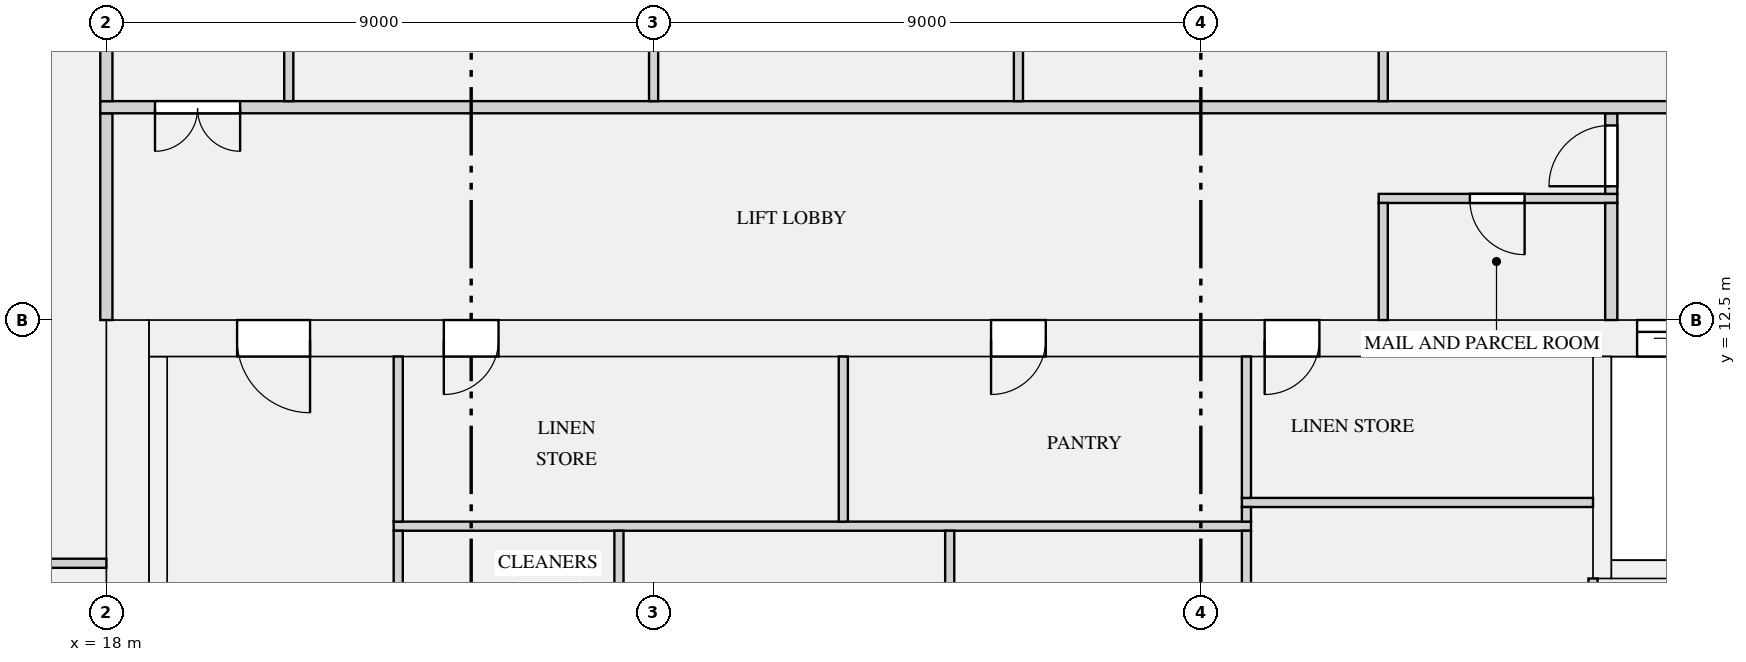
"""IFC4 building model, lengths in metres.
Left out: names, types, materials, properties, quantities, classifications, styles, units other than length and angle.
Written with IfcOpenShell. Run it as: python <this file> out.ifc"""

import sys

from ifc_helpers import new_model, si_unit, direction, frame, frame_2d, origin, place, context, subcontext, project, spatial, rectangle, extrude, element, fill, save


model = new_model("IFC4")
c1 = context("Model", 3, precision=1e-05, world=origin(), true_north=direction((0.0, 1.0)))
c2 = subcontext(c1, "Body", "Model", "MODEL_VIEW")
j1 = project(units=[si_unit("LENGTHUNIT", "METRE"), si_unit("PLANEANGLEUNIT", "RADIAN")], contexts=[c1])
p1 = place(None, origin())
s1 = spatial("IfcSite", under=j1, at=p1, CompositionType="ELEMENT")
p2 = place(p1, origin())
s2 = spatial("IfcBuilding", under=s1, at=p2, CompositionType="ELEMENT")
p3 = place(p2, frame((0.0, 0.0, 160.2)))
s3 = spatial("IfcBuildingStorey", under=s2, at=p3, CompositionType="ELEMENT", Elevation=160.2)
p4 = place(p3, frame((18.35, 0.0, 0.0), z_axis=(0.0, 0.0, 1.0), x_axis=(0.0, 1.0, 0.0)))
e1 = element("IfcWall", 1, at=p4, inside=s3, PredefinedType="SHEAR", context=c2, shape_type="SweptSolid", body=[
    extrude(rectangle(XDim=12.5, YDim=0.7, at=frame_2d((6.25, 0.0))), origin(), (0.0, 0.0, 1.0), 3.15),
])
p5 = place(p3, frame((18.7, 12.2, 0.0), z_axis=(0.0, 0.0, 1.0), x_axis=(1.0, 0.0, 0.0)))
e2 = element("IfcWall", 2, at=p5, inside=s3, PredefinedType="SHEAR", context=c2, shape_type="SweptSolid", body=[
    extrude(rectangle(XDim=34.6, YDim=0.6, at=frame_2d((17.3, 0.0))), origin(), (0.0, 0.0, 1.0), 3.15),
])
p6 = place(p5, frame((24.475, 0.0, 0.0)))
e3 = element("IfcOpeningElement", 3, at=p6, cuts=e2, PredefinedType="OPENING", context=c2, shape_type="SweptSolid", body=[
    extrude(rectangle(XDim=1.1, YDim=2.1, at=frame_2d((0.55, 1.05))), frame((0.0, 0.31, 0.0), z_axis=(0.0, -1.0, 0.0), x_axis=(1.0, 0.0, 0.0)), (0.0, 0.0, 1.0), 0.62),
])
p7 = place(p5, frame((26.725, 0.0, 0.0)))
e4 = element("IfcOpeningElement", 4, at=p7, cuts=e2, PredefinedType="OPENING", context=c2, shape_type="SweptSolid", body=[
    extrude(rectangle(XDim=1.1, YDim=2.1, at=frame_2d((0.55, 1.05))), frame((0.0, 0.31, 0.0), z_axis=(0.0, -1.0, 0.0), x_axis=(1.0, 0.0, 0.0)), (0.0, 0.0, 1.0), 0.62),
])
p8 = place(p5, frame((28.975, 0.0, 0.0)))
e5 = element("IfcOpeningElement", 5, at=p8, cuts=e2, PredefinedType="OPENING", context=c2, shape_type="SweptSolid", body=[
    extrude(rectangle(XDim=1.1, YDim=2.1, at=frame_2d((0.55, 1.05))), frame((0.0, 0.31, 0.0), z_axis=(0.0, -1.0, 0.0), x_axis=(1.0, 0.0, 0.0)), (0.0, 0.0, 1.0), 0.62),
])
p9 = place(p5, frame((4.85, 0.0, 0.0)))
e6 = element("IfcOpeningElement", 6, at=p9, cuts=e2, PredefinedType="OPENING", context=c2, shape_type="SweptSolid", body=[
    extrude(rectangle(XDim=0.9, YDim=2.1, at=frame_2d((0.45, 1.05))), frame((0.0, 0.31, 0.0), z_axis=(0.0, -1.0, 0.0), x_axis=(1.0, 0.0, 0.0)), (0.0, 0.0, 1.0), 0.62),
])
p10 = place(p5, frame((13.85, 0.0, 0.0)))
e7 = element("IfcOpeningElement", 7, at=p10, cuts=e2, PredefinedType="OPENING", context=c2, shape_type="SweptSolid", body=[
    extrude(rectangle(XDim=0.9, YDim=2.1, at=frame_2d((0.45, 1.05))), frame((0.0, 0.31, 0.0), z_axis=(0.0, -1.0, 0.0), x_axis=(1.0, 0.0, 0.0)), (0.0, 0.0, 1.0), 0.62),
])
p11 = place(p5, frame((18.35, 0.0, 0.0)))
e8 = element("IfcOpeningElement", 8, at=p11, cuts=e2, PredefinedType="OPENING", context=c2, shape_type="SweptSolid", body=[
    extrude(rectangle(XDim=0.9, YDim=2.1, at=frame_2d((0.45, 1.05))), frame((0.0, 0.31, 0.0), z_axis=(0.0, -1.0, 0.0), x_axis=(1.0, 0.0, 0.0)), (0.0, 0.0, 1.0), 0.62),
])
p12 = place(p5, frame((1.45, 0.0, 0.0)))
e9 = element("IfcOpeningElement", 9, at=p12, cuts=e2, PredefinedType="OPENING", context=c2, shape_type="SweptSolid", body=[
    extrude(rectangle(XDim=1.2, YDim=2.1, at=frame_2d((0.6, 1.05))), frame((0.0, 0.31, 0.0), z_axis=(0.0, -1.0, 0.0), x_axis=(1.0, 0.0, 0.0)), (0.0, 0.0, 1.0), 0.62),
])
p13 = place(p5, frame((31.95, 0.0, 0.0)))
e10 = element("IfcOpeningElement", 10, at=p13, cuts=e2, PredefinedType="OPENING", context=c2, shape_type="SweptSolid", body=[
    extrude(rectangle(XDim=1.2, YDim=2.1, at=frame_2d((0.6, 1.05))), frame((0.0, 0.31, 0.0), z_axis=(0.0, -1.0, 0.0), x_axis=(1.0, 0.0, 0.0)), (0.0, 0.0, 1.0), 0.62),
])
p14 = place(p3, frame((18.85, 1.0, 0.0), z_axis=(0.0, 0.0, 1.0), x_axis=(0.0, 1.0, 0.0)))
e11 = element("IfcWall", 11, at=p14, inside=s3, PredefinedType="SHEAR", context=c2, shape_type="SweptSolid", body=[
    extrude(rectangle(XDim=10.9, YDim=0.3, at=frame_2d((5.45, 0.0))), origin(), (0.0, 0.0, 1.0), 3.15),
])
p15 = place(p3, frame((42.75, 8.4, 0.0), z_axis=(0.0, 0.0, 1.0), x_axis=(1.0, 0.0, 0.0)))
e12 = element("IfcWall", 12, at=p15, inside=s3, PredefinedType="SHEAR", context=c2, shape_type="SweptSolid", body=[
    extrude(rectangle(XDim=1.95, YDim=0.3, at=frame_2d((0.975, 0.0))), origin(), (0.0, 0.0, 1.0), 3.15),
])
p16 = place(p3, frame((42.6, 8.25, 0.0), z_axis=(0.0, 0.0, 1.0), x_axis=(0.0, 1.0, 0.0)))
e13 = element("IfcWall", 13, at=p16, inside=s3, PredefinedType="SHEAR", context=c2, shape_type="SweptSolid", body=[
    extrude(rectangle(XDim=3.65, YDim=0.3, at=frame_2d((1.825, 0.0))), origin(), (0.0, 0.0, 1.0), 3.15),
])
p17 = place(p3, frame((22.725, 9.11, 0.0), z_axis=(0.0, 0.0, 1.0), x_axis=(1.0, 0.0, 0.0)))
e14 = element("IfcWall", 14, at=p17, inside=s3, PredefinedType="PARTITIONING", context=c2, shape_type="SweptSolid", body=[
    extrude(rectangle(XDim=14.1, YDim=0.15, at=frame_2d((7.05, 0.0))), origin(), (0.0, 0.0, 1.0), 2.83),
])
p18 = place(p3, frame((36.675, 9.5, 0.0), z_axis=(0.0, 0.0, 1.0), x_axis=(1.0, 0.0, 0.0)))
e15 = element("IfcWall", 15, at=p18, inside=s3, PredefinedType="PARTITIONING", context=c2, shape_type="SweptSolid", body=[
    extrude(rectangle(XDim=5.775, YDim=0.15, at=frame_2d((2.887, 0.0))), origin(), (0.0, 0.0, 1.0), 2.83),
])
p19 = place(p3, frame((38.925, 14.5, 0.0), z_axis=(0.0, 0.0, 1.0), x_axis=(1.0, 0.0, 0.0)))
e16 = element("IfcWall", 16, at=p19, inside=s3, PredefinedType="PARTITIONING", context=c2, shape_type="SweptSolid", body=[
    extrude(rectangle(XDim=3.925, YDim=0.15, at=frame_2d((1.962, 0.0))), origin(), (0.0, 0.0, 1.0), 2.83),
])
p20 = place(p19, frame((1.5, 0.0, 0.0)))
e17 = element("IfcOpeningElement", 17, at=p20, cuts=e16, PredefinedType="OPENING", context=c2, shape_type="SweptSolid", body=[
    extrude(rectangle(XDim=0.9, YDim=2.1, at=frame_2d((0.45, 1.05))), frame((0.0, 0.085, 0.0), z_axis=(0.0, -1.0, 0.0), x_axis=(1.0, 0.0, 0.0)), (0.0, 0.0, 1.0), 0.17),
])
p21 = place(p3, frame((42.45, 6.65, 0.0), z_axis=(0.0, 0.0, 1.0), x_axis=(0.0, 1.0, 0.0)))
e18 = element("IfcWall", 18, at=p21, inside=s3, PredefinedType="PARTITIONING", context=c2, shape_type="SweptSolid", body=[
    extrude(rectangle(XDim=1.6, YDim=0.15, at=frame_2d((0.8, 0.0))), origin(), (0.0, 0.0, 1.0), 2.83),
])
for number, where, z_axis, x_axis in (
    (19, (22.8, 6.725, 0.0), (0.0, 0.0, 1.0), (0.0, 1.0, 0.0)),
    (20, (26.43, 6.725, 0.0), (0.0, 0.0, 1.0), (0.0, 1.0, 0.0)),
    (21, (31.87, 6.725, 0.0), (0.0, 0.0, 1.0), (0.0, 1.0, 0.0)),
    (22, (36.75, 6.725, 0.0), (0.0, 0.0, 1.0), (0.0, 1.0, 0.0)),
):
    element("IfcWall", number, at=place(p3, frame(where, z_axis=z_axis, x_axis=x_axis)), inside=s3, PredefinedType="PARTITIONING", context=c2, shape_type="SweptSolid", body=[
        extrude(rectangle(XDim=2.31, YDim=0.15, at=frame_2d((1.155, 0.0))), origin(), (0.0, 0.0, 1.0), 2.83),
    ])
for number, where, z_axis, x_axis in (
    (23, (22.8, 9.185, 0.0), (0.0, 0.0, 1.0), (0.0, 1.0, 0.0)),
    (24, (30.12, 9.185, 0.0), (0.0, 0.0, 1.0), (0.0, 1.0, 0.0)),
):
    element("IfcWall", number, at=place(p3, frame(where, z_axis=z_axis, x_axis=x_axis)), inside=s3, PredefinedType="PARTITIONING", context=c2, shape_type="SweptSolid", body=[
        extrude(rectangle(XDim=2.715, YDim=0.15, at=frame_2d((1.357, 0.0))), origin(), (0.0, 0.0, 1.0), 2.83),
    ])
p22 = place(p3, frame((36.75, 9.185, 0.0), z_axis=(0.0, 0.0, 1.0), x_axis=(0.0, 1.0, 0.0)))
e25 = element("IfcWall", 25, at=p22, inside=s3, PredefinedType="PARTITIONING", context=c2, shape_type="SweptSolid", body=[
    extrude(rectangle(XDim=0.24, YDim=0.15, at=frame_2d((0.12, 0.0))), origin(), (0.0, 0.0, 1.0), 2.83),
])
p23 = place(p3, frame((36.75, 9.575, 0.0), z_axis=(0.0, 0.0, 1.0), x_axis=(0.0, 1.0, 0.0)))
e26 = element("IfcWall", 26, at=p23, inside=s3, PredefinedType="PARTITIONING", context=c2, shape_type="SweptSolid", body=[
    extrude(rectangle(XDim=2.325, YDim=0.15, at=frame_2d((1.163, 0.0))), origin(), (0.0, 0.0, 1.0), 2.83),
])
p24 = place(p3, frame((18.0, 12.5, 0.0), z_axis=(0.0, 0.0, 1.0), x_axis=(0.0, 1.0, 0.0)))
e27 = element("IfcWall", 27, at=p24, inside=s3, PredefinedType="PARTITIONING", context=c2, shape_type="SweptSolid", body=[
    extrude(rectangle(XDim=3.4, YDim=0.2, at=frame_2d((1.7, 0.0))), origin(), (0.0, 0.0, 1.0), 2.83),
])
p25 = place(p3, frame((39.0, 12.5, 0.0), z_axis=(0.0, 0.0, 1.0), x_axis=(0.0, 1.0, 0.0)))
e28 = element("IfcWall", 28, at=p25, inside=s3, PredefinedType="PARTITIONING", context=c2, shape_type="SweptSolid", body=[
    extrude(rectangle(XDim=1.925, YDim=0.15, at=frame_2d((0.962, 0.0))), origin(), (0.0, 0.0, 1.0), 2.83),
])
p26 = place(p3, frame((42.75, 12.5, 0.0), z_axis=(0.0, 0.0, 1.0), x_axis=(0.0, 1.0, 0.0)))
e29 = element("IfcWall", 29, at=p26, inside=s3, PredefinedType="PARTITIONING", context=c2, shape_type="SweptSolid", body=[
    extrude(rectangle(XDim=1.925, YDim=0.2, at=frame_2d((0.962, 0.0))), origin(), (0.0, 0.0, 1.0), 2.83),
])
p27 = place(p3, frame((42.75, 14.575, 0.0), z_axis=(0.0, 0.0, 1.0), x_axis=(0.0, 1.0, 0.0)))
e30 = element("IfcWall", 30, at=p27, inside=s3, PredefinedType="PARTITIONING", context=c2, shape_type="SweptSolid", body=[
    extrude(rectangle(XDim=1.325, YDim=0.2, at=frame_2d((0.663, 0.0))), origin(), (0.0, 0.0, 1.0), 2.83),
])
p28 = place(p27, frame((0.125, 0.0, 0.0)))
e31 = element("IfcOpeningElement", 31, at=p28, cuts=e30, PredefinedType="OPENING", context=c2, shape_type="SweptSolid", body=[
    extrude(rectangle(XDim=1.0, YDim=2.1, at=frame_2d((0.5, 1.05))), frame((0.0, 0.11, 0.0), z_axis=(0.0, -1.0, 0.0), x_axis=(1.0, 0.0, 0.0)), (0.0, 0.0, 1.0), 0.22),
])
p29 = place(p3, frame((5.2, 8.5, 0.0), z_axis=(0.0, 0.0, 1.0), x_axis=(1.0, 0.0, 0.0)))
e32 = element("IfcWall", 32, at=p29, inside=s3, PredefinedType="PARTITIONING", context=c2, shape_type="SweptSolid", body=[
    extrude(rectangle(XDim=12.8, YDim=0.15, at=frame_2d((6.4, 0.0))), origin(), (0.0, 0.0, 1.0), 2.83),
])
p30 = place(p29, frame((10.1, 0.0, 0.0)))
e33 = element("IfcOpeningElement", 33, at=p30, cuts=e32, PredefinedType="OPENING", context=c2, shape_type="SweptSolid", body=[
    extrude(rectangle(XDim=0.9, YDim=2.1, at=frame_2d((0.45, 1.05))), frame((0.0, 0.085, 0.0), z_axis=(0.0, -1.0, 0.0), x_axis=(1.0, 0.0, 0.0)), (0.0, 0.0, 1.0), 0.17),
])
p31 = place(p29, frame((5.3, 0.0, 0.0)))
e34 = element("IfcOpeningElement", 34, at=p31, cuts=e32, PredefinedType="OPENING", context=c2, shape_type="SweptSolid", body=[
    extrude(rectangle(XDim=1.5, YDim=2.1, at=frame_2d((0.75, 1.05))), frame((0.0, 0.085, 0.0), z_axis=(0.0, -1.0, 0.0), x_axis=(1.0, 0.0, 0.0)), (0.0, 0.0, 1.0), 0.17),
])
p32 = place(p3, frame((17.9, 16.0, 0.0), z_axis=(0.0, 0.0, 1.0), x_axis=(1.0, 0.0, 0.0)))
e35 = element("IfcWall", 35, at=p32, inside=s3, PredefinedType="PARTITIONING", context=c2, shape_type="SweptSolid", body=[
    extrude(rectangle(XDim=36.2, YDim=0.2, at=frame_2d((18.1, 0.0))), origin(), (0.0, 0.0, 1.0), 2.83),
])
p33 = place(p32, frame((0.9, 0.0, 0.0)))
e36 = element("IfcOpeningElement", 36, at=p33, cuts=e35, PredefinedType="OPENING", context=c2, shape_type="SweptSolid", body=[
    extrude(rectangle(XDim=1.4, YDim=2.1, at=frame_2d((0.7, 1.05))), frame((0.0, 0.11, 0.0), z_axis=(0.0, -1.0, 0.0), x_axis=(1.0, 0.0, 0.0)), (0.0, 0.0, 1.0), 0.22),
])
p34 = place(p32, frame((33.9, 0.0, 0.0)))
e37 = element("IfcOpeningElement", 37, at=p34, cuts=e35, PredefinedType="OPENING", context=c2, shape_type="SweptSolid", body=[
    extrude(rectangle(XDim=1.4, YDim=2.1, at=frame_2d((0.7, 1.05))), frame((0.0, 0.11, 0.0), z_axis=(0.0, -1.0, 0.0), x_axis=(1.0, 0.0, 0.0)), (0.0, 0.0, 1.0), 0.22),
])
p35 = place(p3, frame((18.0, 16.1, 0.0), z_axis=(0.0, 0.0, 1.0), x_axis=(0.0, 1.0, 0.0)))
e38 = element("IfcWall", 38, at=p35, inside=s3, PredefinedType="PARTITIONING", context=c2, shape_type="SweptSolid", body=[
    extrude(rectangle(XDim=7.8, YDim=0.2, at=frame_2d((3.9, 0.0))), origin(), (0.0, 0.0, 1.0), 2.83),
])
p36 = place(p35, frame((1.85, 0.0, 0.0)))
e39 = element("IfcOpeningElement", 39, at=p36, cuts=e38, PredefinedType="OPENING", context=c2, shape_type="SweptSolid", body=[
    extrude(rectangle(XDim=1.1, YDim=2.1, at=frame_2d((0.55, 1.05))), frame((0.0, 0.11, 0.0), z_axis=(0.0, -1.0, 0.0), x_axis=(1.0, 0.0, 0.0)), (0.0, 0.0, 1.0), 0.22),
])
for number, where, z_axis, x_axis in (
    (40, (21.0, 16.1, 0.0), (0.0, 0.0, 1.0), (0.0, 1.0, 0.0)),
    (41, (27.0, 16.1, 0.0), (0.0, 0.0, 1.0), (0.0, 1.0, 0.0)),
    (42, (33.0, 16.1, 0.0), (0.0, 0.0, 1.0), (0.0, 1.0, 0.0)),
    (43, (39.0, 16.1, 0.0), (0.0, 0.0, 1.0), (0.0, 1.0, 0.0)),
):
    element("IfcWall", number, at=place(p3, frame(where, z_axis=z_axis, x_axis=x_axis)), inside=s3, PredefinedType="PARTITIONING", context=c2, shape_type="SweptSolid", body=[
        extrude(rectangle(XDim=4.825, YDim=0.15, at=frame_2d((2.413, 0.0))), origin(), (0.0, 0.0, 1.0), 2.83),
    ])
p37 = place(p6, origin())
e44 = element("IfcDoor", 44, at=p37, inside=s3, OperationType="DOUBLE_DOOR_SLIDING", PredefinedType="DOOR", context=c2, shape_type="SweptSolid", body=[
    extrude(rectangle(XDim=1.1, YDim=2.1, at=frame_2d((0.55, 1.05))), frame((0.0, 0.025, 0.0), z_axis=(0.0, -1.0, 0.0), x_axis=(1.0, 0.0, 0.0)), (0.0, 0.0, 1.0), 0.05),
])
fill(e3, e44)
p38 = place(p20, frame((0.9, 0.0, 0.0), z_axis=(0.0, 0.0, 1.0), x_axis=(-1.0, 0.0, 0.0)))
e45 = element("IfcDoor", 45, at=p38, inside=s3, OperationType="SINGLE_SWING_LEFT", PredefinedType="DOOR", context=c2, shape_type="SweptSolid", body=[
    extrude(rectangle(XDim=0.9, YDim=2.1, at=frame_2d((0.45, 1.05))), frame((0.0, 0.025, 0.0), z_axis=(0.0, -1.0, 0.0), x_axis=(1.0, 0.0, 0.0)), (0.0, 0.0, 1.0), 0.05),
])
fill(e17, e45)
p39 = place(p9, frame((0.9, 0.0, 0.0), z_axis=(0.0, 0.0, 1.0), x_axis=(-1.0, 0.0, 0.0)))
e46 = element("IfcDoor", 46, at=p39, inside=s3, OperationType="SINGLE_SWING_RIGHT", PredefinedType="DOOR", context=c2, shape_type="SweptSolid", body=[
    extrude(rectangle(XDim=0.9, YDim=2.1, at=frame_2d((0.45, 1.05))), frame((0.0, 0.025, 0.0), z_axis=(0.0, -1.0, 0.0), x_axis=(1.0, 0.0, 0.0)), (0.0, 0.0, 1.0), 0.05),
])
fill(e6, e46)
p40 = place(p10, frame((0.9, 0.0, 0.0), z_axis=(0.0, 0.0, 1.0), x_axis=(-1.0, 0.0, 0.0)))
e47 = element("IfcDoor", 47, at=p40, inside=s3, OperationType="SINGLE_SWING_RIGHT", PredefinedType="DOOR", context=c2, shape_type="SweptSolid", body=[
    extrude(rectangle(XDim=0.9, YDim=2.1, at=frame_2d((0.45, 1.05))), frame((0.0, 0.025, 0.0), z_axis=(0.0, -1.0, 0.0), x_axis=(1.0, 0.0, 0.0)), (0.0, 0.0, 1.0), 0.05),
])
fill(e7, e47)
p41 = place(p11, frame((0.9, 0.0, 0.0), z_axis=(0.0, 0.0, 1.0), x_axis=(-1.0, 0.0, 0.0)))
e48 = element("IfcDoor", 48, at=p41, inside=s3, OperationType="SINGLE_SWING_RIGHT", PredefinedType="DOOR", context=c2, shape_type="SweptSolid", body=[
    extrude(rectangle(XDim=0.9, YDim=2.1, at=frame_2d((0.45, 1.05))), frame((0.0, 0.025, 0.0), z_axis=(0.0, -1.0, 0.0), x_axis=(1.0, 0.0, 0.0)), (0.0, 0.0, 1.0), 0.05),
])
fill(e8, e48)
p42 = place(p12, frame((1.2, 0.0, 0.0), z_axis=(0.0, 0.0, 1.0), x_axis=(-1.0, 0.0, 0.0)))
e49 = element("IfcDoor", 49, at=p42, inside=s3, OperationType="SINGLE_SWING_LEFT", PredefinedType="DOOR", context=c2, shape_type="SweptSolid", body=[
    extrude(rectangle(XDim=1.2, YDim=2.1, at=frame_2d((0.6, 1.05))), frame((0.0, 0.025, 0.0), z_axis=(0.0, -1.0, 0.0), x_axis=(1.0, 0.0, 0.0)), (0.0, 0.0, 1.0), 0.05),
])
fill(e9, e49)
p43 = place(p28, origin())
e50 = element("IfcDoor", 50, at=p43, inside=s3, OperationType="SINGLE_SWING_LEFT", PredefinedType="DOOR", context=c2, shape_type="SweptSolid", body=[
    extrude(rectangle(XDim=1.0, YDim=2.1, at=frame_2d((0.5, 1.05))), frame((0.0, 0.025, 0.0), z_axis=(0.0, -1.0, 0.0), x_axis=(1.0, 0.0, 0.0)), (0.0, 0.0, 1.0), 0.05),
])
fill(e31, e50)
p44 = place(p33, frame((1.4, 0.0, 0.0), z_axis=(0.0, 0.0, 1.0), x_axis=(-1.0, 0.0, 0.0)))
e51 = element("IfcDoor", 51, at=p44, inside=s3, OperationType="DOUBLE_DOOR_SINGLE_SWING", PredefinedType="DOOR", context=c2, shape_type="SweptSolid", body=[
    extrude(rectangle(XDim=1.4, YDim=2.1, at=frame_2d((0.7, 1.05))), frame((0.0, 0.025, 0.0), z_axis=(0.0, -1.0, 0.0), x_axis=(1.0, 0.0, 0.0)), (0.0, 0.0, 1.0), 0.05),
])
fill(e36, e51)
save(model, sys.argv[1])
